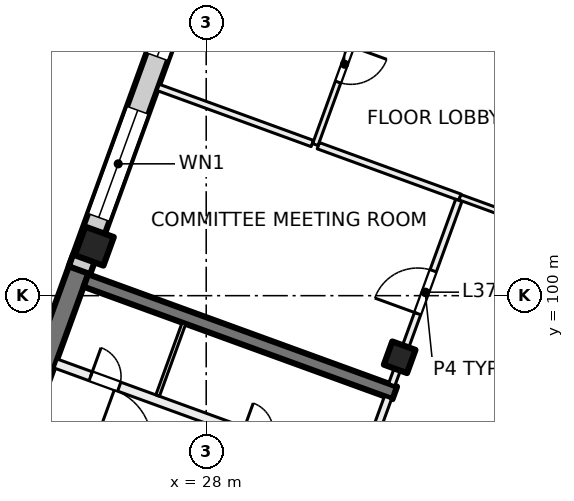
"""IFC4 building model, lengths in metres.
Left out: names, types, materials, properties, quantities, classifications, styles, units other than length and angle.
Written with IfcOpenShell. Run it as: python <this file> out.ifc"""

import sys

from ifc_helpers import new_model, si_unit, direction, frame, frame_2d, origin, origin_2d, place, context, subcontext, project, spatial, rectangle, extrude, element, fill, save


model = new_model("IFC4")
c1 = context("Model", 3, precision=1e-05, world=origin(), true_north=direction((0.0, 1.0)))
c2 = subcontext(c1, "Body", "Model", "MODEL_VIEW")
j1 = project(units=[si_unit("LENGTHUNIT", "METRE"), si_unit("PLANEANGLEUNIT", "RADIAN")], contexts=[c1])
p1 = place(None, origin())
s1 = spatial("IfcSite", under=j1, at=p1, CompositionType="ELEMENT")
p2 = place(p1, origin())
s2 = spatial("IfcBuilding", under=s1, at=p2, CompositionType="ELEMENT")
p3 = place(p2, frame((0.0, 0.0, 158.5)))
s3 = spatial("IfcBuildingStorey", under=s2, at=p3, CompositionType="ELEMENT", Elevation=158.5)
p4 = place(p3, frame((33.091, 98.379, 0.0), z_axis=(0.0, 0.0, 1.0), x_axis=(-0.342020143326, -0.939692620786, 0.0)))
e1 = element("IfcColumn", 1, at=p4, inside=s3, PredefinedType="COLUMN", context=c2, shape_type="SweptSolid", body=[
    extrude(rectangle(XDim=0.65, YDim=0.65, at=origin_2d()), origin(), (0.0, 0.0, 1.0), 4.0),
])
p5 = place(p3, frame((25.056, 101.303, 0.0), z_axis=(0.0, 0.0, 1.0), x_axis=(-0.342020143326, -0.939692620786, 0.0)))
e2 = element("IfcColumn", 2, at=p5, inside=s3, PredefinedType="COLUMN", context=c2, shape_type="SweptSolid", body=[
    extrude(rectangle(XDim=0.8, YDim=0.8, at=origin_2d()), origin(), (0.0, 0.0, 1.0), 4.0),
])
p6 = place(p3, frame((21.694, 92.577, 0.0), z_axis=(0.0, 0.0, 1.0), x_axis=(0.342010253184, 0.939696220444, 0.0)))
e3 = element("IfcWall", 3, at=p6, inside=s3, PredefinedType="SHEAR", context=c2, shape_type="SweptSolid", body=[
    extrude(rectangle(XDim=8.95, YDim=0.55, at=frame_2d((4.475, 0.0))), origin(), (0.0, 0.0, 1.0), 4.0),
])
p7 = place(p3, frame((32.962, 97.441, 0.0), z_axis=(0.0, 0.0, 1.0), x_axis=(-0.939689545667, 0.342028592028, 0.0)))
e4 = element("IfcWall", 4, at=p7, inside=s3, PredefinedType="SHEAR", context=c2, shape_type="SweptSolid", body=[
    extrude(rectangle(XDim=8.65, YDim=0.35, at=frame_2d((4.325, 0.0))), origin(), (0.0, 0.0, 1.0), 4.0),
])
p8 = place(p3, frame((24.666, 100.669, 0.0), z_axis=(0.0, 0.0, 1.0), x_axis=(0.34201964167, 0.939692803373, 0.0)))
e5 = element("IfcWall", 5, at=p8, inside=s3, PredefinedType="SOLIDWALL", context=c2, shape_type="SweptSolid", body=[
    extrude(rectangle(XDim=32.884, YDim=0.6, at=frame_2d((16.442, 0.0))), origin(), (0.0, 0.0, 1.0), 3.625),
])
p9 = place(p8, frame((1.48, 0.0, 0.9)))
e6 = element("IfcOpeningElement", 6, at=p9, cuts=e5, PredefinedType="OPENING", context=c2, shape_type="SweptSolid", body=[
    extrude(rectangle(XDim=3.0, YDim=2.4, at=frame_2d((1.5, 1.2))), frame((0.0, 0.31, 0.0), z_axis=(0.0, -1.0, 0.0), x_axis=(1.0, 0.0, 0.0)), (0.0, 0.0, 1.0), 0.62),
])
p10 = place(p8, frame((5.98, 0.0, 0.9)))
e7 = element("IfcOpeningElement", 7, at=p10, cuts=e5, PredefinedType="OPENING", context=c2, shape_type="SweptSolid", body=[
    extrude(rectangle(XDim=3.0, YDim=2.4, at=frame_2d((1.5, 1.2))), frame((0.0, 0.31, 0.0), z_axis=(0.0, -1.0, 0.0), x_axis=(1.0, 0.0, 0.0)), (0.0, 0.0, 1.0), 0.62),
])
p11 = place(p8, frame((10.48, 0.0, 0.9)))
e8 = element("IfcOpeningElement", 8, at=p11, cuts=e5, PredefinedType="OPENING", context=c2, shape_type="SweptSolid", body=[
    extrude(rectangle(XDim=3.0, YDim=2.4, at=frame_2d((1.5, 1.2))), frame((0.0, 0.31, 0.0), z_axis=(0.0, -1.0, 0.0), x_axis=(1.0, 0.0, 0.0)), (0.0, 0.0, 1.0), 0.62),
])
p12 = place(p8, frame((14.98, 0.0, 0.9)))
e9 = element("IfcOpeningElement", 9, at=p12, cuts=e5, PredefinedType="OPENING", context=c2, shape_type="SweptSolid", body=[
    extrude(rectangle(XDim=3.0, YDim=2.4, at=frame_2d((1.5, 1.2))), frame((0.0, 0.31, 0.0), z_axis=(0.0, -1.0, 0.0), x_axis=(1.0, 0.0, 0.0)), (0.0, 0.0, 1.0), 0.62),
])
p13 = place(p8, frame((19.48, 0.0, 0.9)))
e10 = element("IfcOpeningElement", 10, at=p13, cuts=e5, PredefinedType="OPENING", context=c2, shape_type="SweptSolid", body=[
    extrude(rectangle(XDim=3.0, YDim=2.4, at=frame_2d((1.5, 1.2))), frame((0.0, 0.31, 0.0), z_axis=(0.0, -1.0, 0.0), x_axis=(1.0, 0.0, 0.0)), (0.0, 0.0, 1.0), 0.62),
])
p14 = place(p8, frame((23.98, 0.0, 0.9)))
e11 = element("IfcOpeningElement", 11, at=p14, cuts=e5, PredefinedType="OPENING", context=c2, shape_type="SweptSolid", body=[
    extrude(rectangle(XDim=3.0, YDim=2.4, at=frame_2d((1.5, 1.2))), frame((0.0, 0.31, 0.0), z_axis=(0.0, -1.0, 0.0), x_axis=(1.0, 0.0, 0.0)), (0.0, 0.0, 1.0), 0.62),
])
p15 = place(p8, frame((28.48, 0.0, 0.9)))
e12 = element("IfcOpeningElement", 12, at=p15, cuts=e5, PredefinedType="OPENING", context=c2, shape_type="SweptSolid", body=[
    extrude(rectangle(XDim=3.0, YDim=2.4, at=frame_2d((1.5, 1.2))), frame((0.0, 0.31, 0.0), z_axis=(0.0, -1.0, 0.0), x_axis=(1.0, 0.0, 0.0)), (0.0, 0.0, 1.0), 0.62),
])
p16 = place(p3, frame((31.459, 93.678, 0.0), z_axis=(0.0, 0.0, 1.0), x_axis=(0.341985870128, 0.939705094502, 0.0)))
e13 = element("IfcWall", 13, at=p16, inside=s3, PredefinedType="PARTITIONING", context=c2, shape_type="SweptSolid", body=[
    extrude(rectangle(XDim=3.875, YDim=0.2, at=frame_2d((1.938, 0.0))), origin(), (0.0, 0.0, 1.0), 3.625),
])
p17 = place(p16, frame((0.3, 0.0, 0.0)))
e14 = element("IfcOpeningElement", 14, at=p17, cuts=e13, PredefinedType="OPENING", context=c2, shape_type="SweptSolid", body=[
    extrude(rectangle(XDim=1.2, YDim=2.1, at=frame_2d((0.6, 1.05))), frame((0.0, 0.11, 0.0), z_axis=(0.0, -1.0, 0.0), x_axis=(1.0, 0.0, 0.0)), (0.0, 0.0, 1.0), 0.22),
])
p18 = place(p3, frame((23.483, 96.688, 0.0), z_axis=(0.0, 0.0, 1.0), x_axis=(0.939691007314, -0.342024576271, 0.0)))
e15 = element("IfcWall", 15, at=p18, inside=s3, PredefinedType="PARTITIONING", context=c2, shape_type="SweptSolid", body=[
    extrude(rectangle(XDim=8.425, YDim=0.2, at=frame_2d((4.212, 0.0))), origin(), (0.0, 0.0, 1.0), 3.625),
])
p19 = place(p18, frame((1.688, 0.0, 0.0)))
e16 = element("IfcOpeningElement", 16, at=p19, cuts=e15, PredefinedType="OPENING", context=c2, shape_type="SweptSolid", body=[
    extrude(rectangle(XDim=1.5, YDim=2.1, at=frame_2d((0.75, 1.05))), frame((0.0, 0.11, 0.0), z_axis=(0.0, -1.0, 0.0), x_axis=(1.0, 0.0, 0.0)), (0.0, 0.0, 1.0), 0.22),
])
p20 = place(p3, frame((24.039, 98.215, 0.0), z_axis=(0.0, 0.0, 1.0), x_axis=(0.939687617333, -0.342033889887, 0.0)))
e17 = element("IfcWall", 17, at=p20, inside=s3, PredefinedType="PARTITIONING", context=c2, shape_type="SweptSolid", body=[
    extrude(rectangle(XDim=8.425, YDim=0.25, at=frame_2d((4.212, 0.0))), origin(), (0.0, 0.0, 1.0), 3.625),
])
p21 = place(p20, frame((5.242, 0.0, 0.0)))
e18 = element("IfcOpeningElement", 18, at=p21, cuts=e17, PredefinedType="OPENING", context=c2, shape_type="SweptSolid", body=[
    extrude(rectangle(XDim=0.8, YDim=2.1, at=frame_2d((0.4, 1.05))), frame((0.0, 0.135, 0.0), z_axis=(0.0, -1.0, 0.0), x_axis=(1.0, 0.0, 0.0)), (0.0, 0.0, 1.0), 0.27),
])
p22 = place(p20, frame((0.98, 0.0, 0.0)))
e19 = element("IfcOpeningElement", 19, at=p22, cuts=e17, PredefinedType="OPENING", context=c2, shape_type="SweptSolid", body=[
    extrude(rectangle(XDim=0.8, YDim=2.1, at=frame_2d((0.4, 1.05))), frame((0.0, 0.135, 0.0), z_axis=(0.0, -1.0, 0.0), x_axis=(1.0, 0.0, 0.0)), (0.0, 0.0, 1.0), 0.27),
])
p23 = place(p3, frame((26.722, 97.371, 0.0), z_axis=(0.0, 0.0, 1.0), x_axis=(0.342004391282, 0.939698353911, 0.0)))
e20 = element("IfcWall", 20, at=p23, inside=s3, PredefinedType="PARTITIONING", context=c2, shape_type="SweptSolid", body=[
    extrude(rectangle(XDim=2.025, YDim=0.1, at=frame_2d((1.013, 0.0))), origin(), (0.0, 0.0, 1.0), 3.625),
])
p24 = place(p3, frame((26.736, 105.48, 0.0), z_axis=(0.0, 0.0, 1.0), x_axis=(0.939677739056, -0.342061027776, 0.0)))
e21 = element("IfcWall", 21, at=p24, inside=s3, PredefinedType="PARTITIONING", context=c2, shape_type="SweptSolid", body=[
    extrude(rectangle(XDim=4.315, YDim=0.175, at=frame_2d((2.158, 0.0))), origin(), (0.0, 0.0, 1.0), 3.625),
])
p25 = place(p3, frame((30.95, 103.946, 0.0), z_axis=(0.0, 0.0, 1.0), x_axis=(0.939739492658, -0.341891336449, 0.0)))
e22 = element("IfcWall", 22, at=p25, inside=s3, PredefinedType="PARTITIONING", context=c2, shape_type="SweptSolid", body=[
    extrude(rectangle(XDim=3.966, YDim=0.175, at=frame_2d((1.983, 0.0))), origin(), (0.0, 0.0, 1.0), 3.625),
])
p26 = place(p3, frame((32.436, 108.274, 0.0), z_axis=(0.0, 0.0, 1.0), x_axis=(-0.342145890874, -0.939646842893, 0.0)))
e23 = element("IfcWall", 23, at=p26, inside=s3, PredefinedType="PARTITIONING", context=c2, shape_type="SweptSolid", body=[
    extrude(rectangle(XDim=4.574, YDim=0.15, at=frame_2d((2.287, 0.0))), origin(), (0.0, 0.0, 1.0), 3.625),
])
p27 = place(p26, frame((1.824, 0.0, 0.0)))
e24 = element("IfcOpeningElement", 24, at=p27, cuts=e23, PredefinedType="OPENING", context=c2, shape_type="SweptSolid", body=[
    extrude(rectangle(XDim=1.0, YDim=2.1, at=frame_2d((0.5, 1.05))), frame((0.0, 0.085, 0.0), z_axis=(0.0, -1.0, 0.0), x_axis=(1.0, 0.0, 0.0)), (0.0, 0.0, 1.0), 0.17),
])
p28 = place(p3, frame((32.881, 97.657, 0.0), z_axis=(0.0, 0.0, 1.0), x_axis=(0.342058204353, 0.939678766832, 0.0)))
e25 = element("IfcWall", 25, at=p28, inside=s3, PredefinedType="PARTITIONING", context=c2, shape_type="SweptSolid", body=[
    extrude(rectangle(XDim=5.163, YDim=0.175, at=frame_2d((2.581, 0.0))), origin(), (0.0, 0.0, 1.0), 3.625),
])
p29 = place(p28, frame((1.991, 0.0, 0.0)))
e26 = element("IfcOpeningElement", 26, at=p29, cuts=e25, PredefinedType="OPENING", context=c2, shape_type="SweptSolid", body=[
    extrude(rectangle(XDim=1.2, YDim=2.1, at=frame_2d((0.6, 1.05))), frame((0.0, 0.097, 0.0), z_axis=(0.0, -1.0, 0.0), x_axis=(1.0, 0.0, 0.0)), (0.0, 0.0, 1.0), 0.195),
])
p30 = place(p3, frame((34.677, 102.59, 0.0), z_axis=(0.0, 0.0, 1.0), x_axis=(0.939683705252, -0.342044637561, 0.0)))
e27 = element("IfcWall", 27, at=p30, inside=s3, PredefinedType="PARTITIONING", context=c2, shape_type="SweptSolid", body=[
    extrude(rectangle(XDim=8.45, YDim=0.15, at=frame_2d((4.225, 0.0))), origin(), (0.0, 0.0, 1.0), 3.625),
])
p31 = place(p9, origin())
e28 = element("IfcWindow", 28, at=p31, inside=s3, PartitioningType="SINGLE_PANEL", PredefinedType="WINDOW", context=c2, shape_type="SweptSolid", body=[
    extrude(rectangle(XDim=3.0, YDim=2.4, at=frame_2d((1.5, 1.2))), frame((0.0, 0.03, 0.0), z_axis=(0.0, -1.0, 0.0), x_axis=(1.0, 0.0, 0.0)), (0.0, 0.0, 1.0), 0.06),
])
fill(e6, e28)
p32 = place(p10, origin())
e29 = element("IfcWindow", 29, at=p32, inside=s3, PartitioningType="SINGLE_PANEL", PredefinedType="WINDOW", context=c2, shape_type="SweptSolid", body=[
    extrude(rectangle(XDim=3.0, YDim=2.4, at=frame_2d((1.5, 1.2))), frame((0.0, 0.03, 0.0), z_axis=(0.0, -1.0, 0.0), x_axis=(1.0, 0.0, 0.0)), (0.0, 0.0, 1.0), 0.06),
])
fill(e7, e29)
p33 = place(p22, origin())
e30 = element("IfcDoor", 30, at=p33, inside=s3, OperationType="SINGLE_SWING_RIGHT", PredefinedType="DOOR", context=c2, shape_type="SweptSolid", body=[
    extrude(rectangle(XDim=0.8, YDim=2.1, at=frame_2d((0.4, 1.05))), frame((0.0, 0.025, 0.0), z_axis=(0.0, -1.0, 0.0), x_axis=(1.0, 0.0, 0.0)), (0.0, 0.0, 1.0), 0.05),
])
fill(e19, e30)
p34 = place(p29, origin())
e31 = element("IfcDoor", 31, at=p34, inside=s3, OperationType="DOUBLE_DOOR_SINGLE_SWING", PredefinedType="DOOR", context=c2, shape_type="SweptSolid", body=[
    extrude(rectangle(XDim=1.2, YDim=2.1, at=frame_2d((0.6, 1.05))), frame((0.0, 0.025, 0.0), z_axis=(0.0, -1.0, 0.0), x_axis=(1.0, 0.0, 0.0)), (0.0, 0.0, 1.0), 0.05),
])
fill(e26, e31)
p35 = place(p27, origin())
e32 = element("IfcDoor", 32, at=p35, inside=s3, OperationType="SINGLE_SWING_LEFT", PredefinedType="DOOR", context=c2, shape_type="SweptSolid", body=[
    extrude(rectangle(XDim=1.0, YDim=2.1, at=frame_2d((0.5, 1.05))), frame((0.0, 0.025, 0.0), z_axis=(0.0, -1.0, 0.0), x_axis=(1.0, 0.0, 0.0)), (0.0, 0.0, 1.0), 0.05),
])
fill(e24, e32)
save(model, sys.argv[1])
